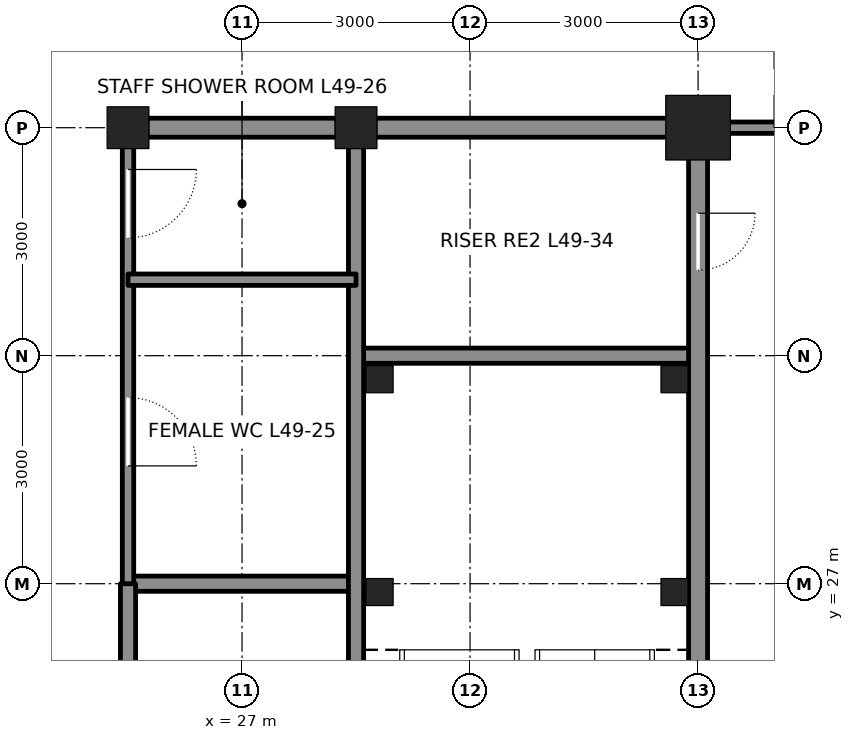
"""IFC4 building model, lengths in metres.
Left out: names, types, materials, properties, quantities, classifications, styles, units other than length and angle.
Written with IfcOpenShell. Run it as: python <this file> out.ifc"""

import sys

from ifc_helpers import new_model, si_unit, direction, frame, frame_2d, origin, origin_2d, place, context, subcontext, project, spatial, rectangle, hollow_rectangle, extrude, element, fill, save


model = new_model("IFC4")
c1 = context("Model", 3, precision=1e-05, world=origin(), true_north=direction((0.0, 1.0)))
c2 = subcontext(c1, "Body", "Model", "MODEL_VIEW")
j1 = project(units=[si_unit("LENGTHUNIT", "METRE"), si_unit("PLANEANGLEUNIT", "RADIAN")], contexts=[c1])
p1 = place(None, origin())
s1 = spatial("IfcSite", under=j1, at=p1, CompositionType="ELEMENT")
p2 = place(p1, origin())
s2 = spatial("IfcBuilding", under=s1, at=p2, CompositionType="ELEMENT")
p3 = place(p2, frame((0.0, 0.0, 222.3)))
s3 = spatial("IfcBuildingStorey", under=s2, at=p3, CompositionType="ELEMENT", Elevation=222.3)
for number, where, z_axis, x_axis in (
    (1, (25.5, 33.0, 0.0), (0.0, 0.0, 1.0), (1.0, 0.0, 0.0)),
    (2, (28.5, 33.0, 0.0), (0.0, 0.0, 1.0), (1.0, 0.0, 0.0)),
):
    element("IfcColumn", number, at=place(p3, frame(where, z_axis=z_axis, x_axis=x_axis)), inside=s3, PredefinedType="COLUMN", context=c2, shape_type="SweptSolid", body=[
        extrude(hollow_rectangle(XDim=0.55, YDim=0.55, WallThickness=0.045, at=origin_2d()), origin(), (0.0, 0.0, 1.0), 4.2),
    ])
p4 = place(p3, frame((33.0, 33.0, 0.0), z_axis=(0.0, 0.0, 1.0), x_axis=(1.0, 0.0, 0.0)))
e3 = element("IfcColumn", 3, at=p4, inside=s3, PredefinedType="COLUMN", context=c2, shape_type="SweptSolid", body=[
    extrude(hollow_rectangle(XDim=0.85, YDim=0.85, WallThickness=0.085, at=origin_2d()), origin(), (0.0, 0.0, 1.0), 4.2),
])
p5 = place(p3, frame((25.5, 27.0, 0.0), z_axis=(0.0, 0.0, 1.0), x_axis=(1.0, 0.0, 0.0)))
e4 = element("IfcWall", 4, at=p5, inside=s3, PredefinedType="SOLIDWALL", context=c2, shape_type="SweptSolid", body=[
    extrude(rectangle(XDim=3.0, YDim=0.2, at=frame_2d((1.5, 0.0))), origin(), (0.0, 0.0, 1.0), 4.04),
])
p6 = place(p3, frame((28.5, 30.0, 0.0), z_axis=(0.0, 0.0, 1.0), x_axis=(1.0, 0.0, 0.0)))
e5 = element("IfcWall", 5, at=p6, inside=s3, PredefinedType="SOLIDWALL", context=c2, shape_type="SweptSolid", body=[
    extrude(rectangle(XDim=4.5, YDim=0.2, at=frame_2d((2.25, 0.0))), origin(), (0.0, 0.0, 1.0), 4.04),
])
p7 = place(p3, frame((25.75, 33.0, 0.0), z_axis=(0.0, 0.0, 1.0), x_axis=(1.0, 0.0, 0.0)))
e6 = element("IfcWall", 6, at=p7, inside=s3, PredefinedType="SOLIDWALL", context=c2, shape_type="SweptSolid", body=[
    extrude(rectangle(XDim=2.5, YDim=0.25, at=frame_2d((1.25, 0.0))), origin(), (0.0, 0.0, 1.0), 3.181),
])
p8 = place(p3, frame((28.75, 33.0, 0.0), z_axis=(0.0, 0.0, 1.0), x_axis=(1.0, 0.0, 0.0)))
e7 = element("IfcWall", 7, at=p8, inside=s3, PredefinedType="SOLIDWALL", context=c2, shape_type="SweptSolid", body=[
    extrude(rectangle(XDim=4.0, YDim=0.25, at=frame_2d((2.0, 0.0))), origin(), (0.0, 0.0, 1.0), 3.181),
])
p9 = place(p3, frame((25.5, 15.0, 0.0), z_axis=(0.0, 0.0, 1.0), x_axis=(0.0, 1.0, 0.0)))
e8 = element("IfcWall", 8, at=p9, inside=s3, PredefinedType="SOLIDWALL", context=c2, shape_type="SweptSolid", body=[
    extrude(rectangle(XDim=12.0, YDim=0.2, at=frame_2d((6.0, 0.0))), origin(), (0.0, 0.0, 1.0), 3.064),
])
p10 = place(p3, frame((25.5, 27.0, 0.0), z_axis=(0.0, 0.0, 1.0), x_axis=(0.0, 1.0, 0.0)))
e9 = element("IfcWall", 9, at=p10, inside=s3, PredefinedType="PARTITIONING", context=c2, shape_type="SweptSolid", body=[
    extrude(rectangle(XDim=5.75, YDim=0.15, at=frame_2d((2.875, 0.0))), origin(), (0.0, 0.0, 1.0), 3.064),
])
p11 = place(p10, frame((1.55, 0.0, 0.0)))
e10 = element("IfcOpeningElement", 10, at=p11, cuts=e9, PredefinedType="OPENING", context=c2, shape_type="SweptSolid", body=[
    extrude(rectangle(XDim=0.9, YDim=2.1, at=frame_2d((0.45, 1.05))), frame((0.0, 0.085, 0.0), z_axis=(0.0, -1.0, 0.0), x_axis=(1.0, 0.0, 0.0)), (0.0, 0.0, 1.0), 0.17),
])
p12 = place(p10, frame((4.55, 0.0, 0.0)))
e11 = element("IfcOpeningElement", 11, at=p12, cuts=e9, PredefinedType="OPENING", context=c2, shape_type="SweptSolid", body=[
    extrude(rectangle(XDim=0.9, YDim=2.1, at=frame_2d((0.45, 1.05))), frame((0.0, 0.085, 0.0), z_axis=(0.0, -1.0, 0.0), x_axis=(1.0, 0.0, 0.0)), (0.0, 0.0, 1.0), 0.17),
])
p13 = place(p3, frame((28.5, 24.25, 0.0), z_axis=(0.0, 0.0, 1.0), x_axis=(0.0, 1.0, 0.0)))
e12 = element("IfcWall", 12, at=p13, inside=s3, PredefinedType="SOLIDWALL", context=c2, shape_type="SweptSolid", body=[
    extrude(rectangle(XDim=8.5, YDim=0.2, at=frame_2d((4.25, 0.0))), origin(), (0.0, 0.0, 1.0), 3.113),
])
p14 = place(p3, frame((33.0, 24.25, 0.0), z_axis=(0.0, 0.0, 1.0), x_axis=(0.0, 1.0, 0.0)))
e13 = element("IfcWall", 13, at=p14, inside=s3, PredefinedType="SOLIDWALL", context=c2, shape_type="SweptSolid", body=[
    extrude(rectangle(XDim=8.5, YDim=0.25, at=frame_2d((4.25, 0.0))), origin(), (0.0, 0.0, 1.0), 3.113),
])
p15 = place(p14, frame((6.875, 0.0, 0.0)))
e14 = element("IfcOpeningElement", 14, at=p15, cuts=e13, PredefinedType="OPENING", context=c2, shape_type="SweptSolid", body=[
    extrude(rectangle(XDim=0.75, YDim=2.1, at=frame_2d((0.375, 1.05))), frame((0.0, 0.135, 0.0), z_axis=(0.0, -1.0, 0.0), x_axis=(1.0, 0.0, 0.0)), (0.0, 0.0, 1.0), 0.27),
])
p16 = place(p3, frame((25.5, 31.0, 0.0), z_axis=(0.0, 0.0, 1.0), x_axis=(1.0, 0.0, 0.0)))
e15 = element("IfcWall", 15, at=p16, inside=s3, PredefinedType="PARTITIONING", context=c2, shape_type="SweptSolid", body=[
    extrude(rectangle(XDim=3.0, YDim=0.15, at=frame_2d((1.5, 0.0))), origin(), (0.0, 0.0, 1.0), 4.04),
])
p17 = place(p3, frame((33.0, 33.0, 0.0), z_axis=(0.0, 0.0, 1.0), x_axis=(1.0, 0.0, 0.0)))
e16 = element("IfcWall", 16, at=p17, inside=s3, PredefinedType="PARTITIONING", context=c2, shape_type="SweptSolid", body=[
    extrude(rectangle(XDim=3.0, YDim=0.15, at=frame_2d((1.5, 0.0))), origin(), (0.0, 0.0, 1.0), 3.27),
])
p18 = place(p17, frame((1.0, 0.0, 0.0)))
e17 = element("IfcOpeningElement", 17, at=p18, cuts=e16, PredefinedType="OPENING", context=c2, shape_type="SweptSolid", body=[
    extrude(rectangle(XDim=1.0, YDim=2.4, at=frame_2d((0.5, 1.2))), frame((0.0, 0.085, 0.0), z_axis=(0.0, -1.0, 0.0), x_axis=(1.0, 0.0, 0.0)), (0.0, 0.0, 1.0), 0.17),
])
for number, where, z_axis, x_axis in (
    (18, (28.81, 29.69, 0.0), (0.0, 0.0, 1.0), (1.0, 0.0, 0.0)),
    (19, (32.69, 29.69, 0.0), (0.0, 0.0, 1.0), (1.0, 0.0, 0.0)),
    (20, (28.81, 26.89, 0.0), (0.0, 0.0, 1.0), (1.0, 0.0, 0.0)),
    (21, (32.69, 26.89, 0.0), (0.0, 0.0, 1.0), (1.0, 0.0, 0.0)),
):
    element("IfcColumn", number, at=place(p3, frame(where, z_axis=z_axis, x_axis=x_axis)), inside=s3, PredefinedType="COLUMN", context=c2, shape_type="SweptSolid", body=[
        extrude(hollow_rectangle(XDim=0.356, YDim=0.356, WallThickness=0.009, at=origin_2d()), origin(), (0.0, 0.0, 1.0), 4.2),
    ])
p19 = place(p15, frame((0.75, 0.0, 0.0), z_axis=(0.0, 0.0, 1.0), x_axis=(-1.0, 0.0, 0.0)))
e22 = element("IfcDoor", 22, at=p19, inside=s3, OperationType="SINGLE_SWING_LEFT", PredefinedType="DOOR", context=c2, shape_type="SweptSolid", body=[
    extrude(rectangle(XDim=0.75, YDim=2.1, at=frame_2d((0.375, 1.05))), frame((0.0, 0.025, 0.0), z_axis=(0.0, -1.0, 0.0), x_axis=(1.0, 0.0, 0.0)), (0.0, 0.0, 1.0), 0.05),
])
fill(e14, e22)
p20 = place(p11, frame((0.9, 0.0, 0.0), z_axis=(0.0, 0.0, 1.0), x_axis=(-1.0, 0.0, 0.0)))
e23 = element("IfcDoor", 23, at=p20, inside=s3, OperationType="SINGLE_SWING_RIGHT", PredefinedType="DOOR", context=c2, shape_type="SweptSolid", body=[
    extrude(rectangle(XDim=0.9, YDim=2.1, at=frame_2d((0.45, 1.05))), frame((0.0, 0.025, 0.0), z_axis=(0.0, -1.0, 0.0), x_axis=(1.0, 0.0, 0.0)), (0.0, 0.0, 1.0), 0.05),
])
fill(e10, e23)
p21 = place(p12, frame((0.9, 0.0, 0.0), z_axis=(0.0, 0.0, 1.0), x_axis=(-1.0, 0.0, 0.0)))
e24 = element("IfcDoor", 24, at=p21, inside=s3, OperationType="SINGLE_SWING_LEFT", PredefinedType="DOOR", context=c2, shape_type="SweptSolid", body=[
    extrude(rectangle(XDim=0.9, YDim=2.1, at=frame_2d((0.45, 1.05))), frame((0.0, 0.025, 0.0), z_axis=(0.0, -1.0, 0.0), x_axis=(1.0, 0.0, 0.0)), (0.0, 0.0, 1.0), 0.05),
])
fill(e11, e24)
save(model, sys.argv[1])
